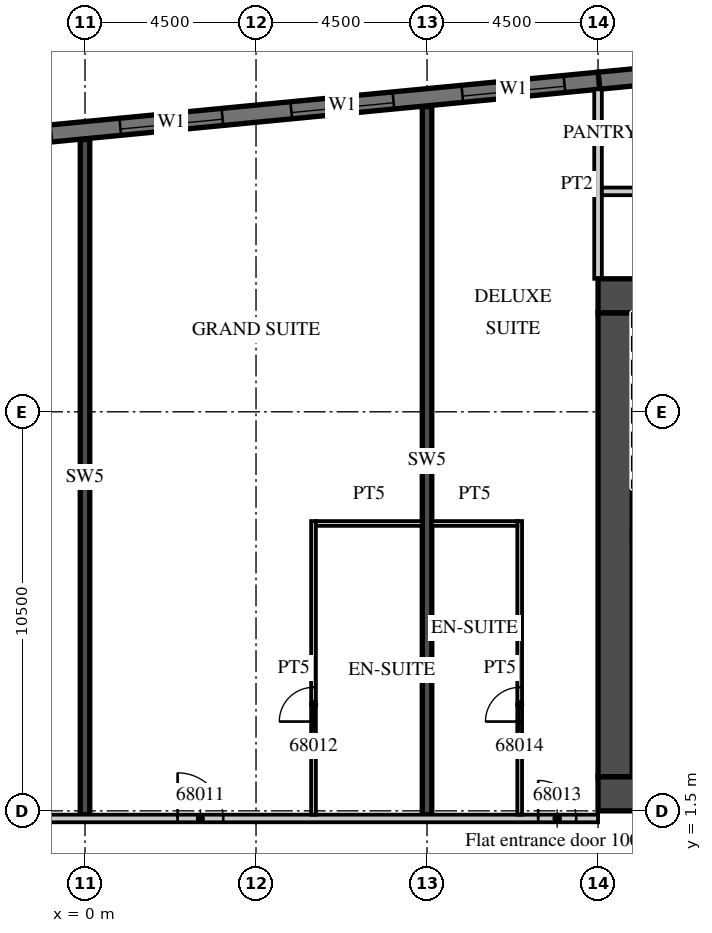
"""IFC4 building model, lengths in metres.
Left out: names, types, materials, properties, quantities, classifications, styles, units other than length and angle.
Written with IfcOpenShell. Run it as: python <this file> out.ifc"""

import sys

from ifc_helpers import new_model, si_unit, direction, frame, frame_2d, origin, place, context, subcontext, project, spatial, rectangle, extrude, element, fill, save


model = new_model("IFC4")
c1 = context("Model", 3, precision=1e-05, world=origin(), true_north=direction((0.0, 1.0)))
c2 = subcontext(c1, "Body", "Model", "MODEL_VIEW")
j1 = project(units=[si_unit("LENGTHUNIT", "METRE"), si_unit("PLANEANGLEUNIT", "RADIAN")], contexts=[c1])
p1 = place(None, origin())
s1 = spatial("IfcSite", under=j1, at=p1, CompositionType="ELEMENT")
p2 = place(p1, origin())
s2 = spatial("IfcBuilding", under=s1, at=p2, CompositionType="ELEMENT")
p3 = place(p2, frame((0.0, 0.0, 275.1)))
s3 = spatial("IfcBuildingStorey", under=s2, at=p3, CompositionType="ELEMENT", Elevation=275.1)
p4 = place(p3, frame((0.0, 1.4, 0.0), z_axis=(0.0, 0.0, 1.0), x_axis=(0.0, 1.0, 0.0)))
e1 = element("IfcWall", 1, at=p4, inside=s3, PredefinedType="SHEAR", context=c2, shape_type="SweptSolid", body=[
    extrude(rectangle(XDim=17.763, YDim=0.25, at=frame_2d((8.881, 0.0))), origin(), (0.0, 0.0, 1.0), 3.3),
])
p5 = place(p3, frame((9.0, 1.4, 0.0), z_axis=(0.0, 0.0, 1.0), x_axis=(0.0, 1.0, 0.0)))
e2 = element("IfcWall", 2, at=p5, inside=s3, PredefinedType="SHEAR", context=c2, shape_type="SweptSolid", body=[
    extrude(rectangle(XDim=18.629, YDim=0.25, at=frame_2d((9.315, 0.0))), origin(), (0.0, 0.0, 1.0), 3.3),
])
p6 = place(p3, frame((30.946, 22.391, 0.0), z_axis=(0.0, 0.0, 1.0), x_axis=(-0.995396397117, -0.095843688398, 0.0)))
e3 = element("IfcWall", 3, at=p6, inside=s3, PredefinedType="SOLIDWALL", context=c2, shape_type="SweptSolid", body=[
    extrude(rectangle(XDim=17.505, YDim=0.45, at=frame_2d((8.752, 0.0))), origin(), (0.0, 0.0, 1.0), 3.02),
])
p7 = place(p3, frame((13.521, 20.713, 0.0), z_axis=(0.0, 0.0, 1.0), x_axis=(-0.995396277313, -0.095844932638, 0.0)))
e4 = element("IfcWall", 4, at=p7, inside=s3, PredefinedType="SOLIDWALL", context=c2, shape_type="SweptSolid", body=[
    extrude(rectangle(XDim=51.495, YDim=0.45, at=frame_2d((25.748, 0.0))), origin(), (0.0, 0.0, 1.0), 3.02),
])
p8 = place(p7, frame((0.91, 0.0, 0.45)))
e5 = element("IfcOpeningElement", 5, at=p8, cuts=e4, PredefinedType="OPENING", context=c2, shape_type="SweptSolid", body=[
    extrude(rectangle(XDim=2.7, YDim=2.25, at=frame_2d((1.35, 1.125))), frame((0.0, 0.235, 0.0), z_axis=(0.0, -1.0, 0.0), x_axis=(1.0, 0.0, 0.0)), (0.0, 0.0, 1.0), 0.47),
])
p9 = place(p7, frame((5.431, 0.0, 0.45)))
e6 = element("IfcOpeningElement", 6, at=p9, cuts=e4, PredefinedType="OPENING", context=c2, shape_type="SweptSolid", body=[
    extrude(rectangle(XDim=2.7, YDim=2.25, at=frame_2d((1.35, 1.125))), frame((0.0, 0.235, 0.0), z_axis=(0.0, -1.0, 0.0), x_axis=(1.0, 0.0, 0.0)), (0.0, 0.0, 1.0), 0.47),
])
p10 = place(p7, frame((9.952, 0.0, 0.45)))
e7 = element("IfcOpeningElement", 7, at=p10, cuts=e4, PredefinedType="OPENING", context=c2, shape_type="SweptSolid", body=[
    extrude(rectangle(XDim=2.7, YDim=2.25, at=frame_2d((1.35, 1.125))), frame((0.0, 0.235, 0.0), z_axis=(0.0, -1.0, 0.0), x_axis=(1.0, 0.0, 0.0)), (0.0, 0.0, 1.0), 0.47),
])
p11 = place(p7, frame((14.473, 0.0, 0.45)))
e8 = element("IfcOpeningElement", 8, at=p11, cuts=e4, PredefinedType="OPENING", context=c2, shape_type="SweptSolid", body=[
    extrude(rectangle(XDim=2.7, YDim=2.25, at=frame_2d((1.35, 1.125))), frame((0.0, 0.235, 0.0), z_axis=(0.0, -1.0, 0.0), x_axis=(1.0, 0.0, 0.0)), (0.0, 0.0, 1.0), 0.47),
])
p12 = place(p7, frame((18.994, 0.0, 0.45)))
e9 = element("IfcOpeningElement", 9, at=p12, cuts=e4, PredefinedType="OPENING", context=c2, shape_type="SweptSolid", body=[
    extrude(rectangle(XDim=2.7, YDim=2.25, at=frame_2d((1.35, 1.125))), frame((0.0, 0.235, 0.0), z_axis=(0.0, -1.0, 0.0), x_axis=(1.0, 0.0, 0.0)), (0.0, 0.0, 1.0), 0.47),
])
p13 = place(p7, frame((23.514, 0.0, 0.45)))
e10 = element("IfcOpeningElement", 10, at=p13, cuts=e4, PredefinedType="OPENING", context=c2, shape_type="SweptSolid", body=[
    extrude(rectangle(XDim=2.7, YDim=2.25, at=frame_2d((1.35, 1.125))), frame((0.0, 0.235, 0.0), z_axis=(0.0, -1.0, 0.0), x_axis=(1.0, 0.0, 0.0)), (0.0, 0.0, 1.0), 0.47),
])
p14 = place(p7, frame((28.035, 0.0, 0.45)))
e11 = element("IfcOpeningElement", 11, at=p14, cuts=e4, PredefinedType="OPENING", context=c2, shape_type="SweptSolid", body=[
    extrude(rectangle(XDim=2.7, YDim=2.25, at=frame_2d((1.35, 1.125))), frame((0.0, 0.235, 0.0), z_axis=(0.0, -1.0, 0.0), x_axis=(1.0, 0.0, 0.0)), (0.0, 0.0, 1.0), 0.47),
])
p15 = place(p7, frame((32.556, 0.0, 0.45)))
e12 = element("IfcOpeningElement", 12, at=p15, cuts=e4, PredefinedType="OPENING", context=c2, shape_type="SweptSolid", body=[
    extrude(rectangle(XDim=2.7, YDim=2.25, at=frame_2d((1.35, 1.125))), frame((0.0, 0.235, 0.0), z_axis=(0.0, -1.0, 0.0), x_axis=(1.0, 0.0, 0.0)), (0.0, 0.0, 1.0), 0.47),
])
p16 = place(p7, frame((37.077, 0.0, 0.45)))
e13 = element("IfcOpeningElement", 13, at=p16, cuts=e4, PredefinedType="OPENING", context=c2, shape_type="SweptSolid", body=[
    extrude(rectangle(XDim=2.7, YDim=2.25, at=frame_2d((1.35, 1.125))), frame((0.0, 0.235, 0.0), z_axis=(0.0, -1.0, 0.0), x_axis=(1.0, 0.0, 0.0)), (0.0, 0.0, 1.0), 0.47),
])
p17 = place(p7, frame((41.598, 0.0, 0.45)))
e14 = element("IfcOpeningElement", 14, at=p17, cuts=e4, PredefinedType="OPENING", context=c2, shape_type="SweptSolid", body=[
    extrude(rectangle(XDim=2.7, YDim=2.25, at=frame_2d((1.35, 1.125))), frame((0.0, 0.235, 0.0), z_axis=(0.0, -1.0, 0.0), x_axis=(1.0, 0.0, 0.0)), (0.0, 0.0, 1.0), 0.47),
])
p18 = place(p7, frame((46.118, 0.0, 0.45)))
e15 = element("IfcOpeningElement", 15, at=p18, cuts=e4, PredefinedType="OPENING", context=c2, shape_type="SweptSolid", body=[
    extrude(rectangle(XDim=2.7, YDim=2.25, at=frame_2d((1.35, 1.125))), frame((0.0, 0.235, 0.0), z_axis=(0.0, -1.0, 0.0), x_axis=(1.0, 0.0, 0.0)), (0.0, 0.0, 1.0), 0.47),
])
p19 = place(p3, frame((13.5, 15.5, 0.0), z_axis=(0.0, 0.0, 1.0), x_axis=(0.0, 1.0, 0.0)))
e16 = element("IfcWall", 16, at=p19, inside=s3, PredefinedType="PARTITIONING", context=c2, shape_type="SweptSolid", body=[
    extrude(rectangle(XDim=4.985, YDim=0.2, at=frame_2d((2.493, 0.0))), origin(), (0.0, 0.0, 1.0), 3.02),
])
p20 = place(p3, frame((-39.909, 1.3, 0.0), z_axis=(0.0, 0.0, 1.0), x_axis=(1.0, 0.0, 0.0)))
e17 = element("IfcWall", 17, at=p20, inside=s3, PredefinedType="PARTITIONING", context=c2, shape_type="SweptSolid", body=[
    extrude(rectangle(XDim=53.409, YDim=0.2, at=frame_2d((26.705, 0.0))), origin(), (0.0, 0.0, 1.0), 3.02),
])
p21 = place(p20, frame((0.15, 0.0, 0.0)))
e18 = element("IfcOpeningElement", 18, at=p21, cuts=e17, PredefinedType="OPENING", context=c2, shape_type="SweptSolid", body=[
    extrude(rectangle(XDim=0.9, YDim=2.1, at=frame_2d((0.45, 1.05))), frame((0.0, 0.11, 0.0), z_axis=(0.0, -1.0, 0.0), x_axis=(1.0, 0.0, 0.0)), (0.0, 0.0, 1.0), 0.22),
])
p22 = place(p20, frame((9.271, 0.0, 0.0)))
e19 = element("IfcOpeningElement", 19, at=p22, cuts=e17, PredefinedType="OPENING", context=c2, shape_type="SweptSolid", body=[
    extrude(rectangle(XDim=1.2, YDim=2.1, at=frame_2d((0.6, 1.05))), frame((0.0, 0.11, 0.0), z_axis=(0.0, -1.0, 0.0), x_axis=(1.0, 0.0, 0.0)), (0.0, 0.0, 1.0), 0.22),
])
p23 = place(p20, frame((18.271, 0.0, 0.0)))
e20 = element("IfcOpeningElement", 20, at=p23, cuts=e17, PredefinedType="OPENING", context=c2, shape_type="SweptSolid", body=[
    extrude(rectangle(XDim=1.2, YDim=2.1, at=frame_2d((0.6, 1.05))), frame((0.0, 0.11, 0.0), z_axis=(0.0, -1.0, 0.0), x_axis=(1.0, 0.0, 0.0)), (0.0, 0.0, 1.0), 0.22),
])
p24 = place(p20, frame((27.271, 0.0, 0.0)))
e21 = element("IfcOpeningElement", 21, at=p24, cuts=e17, PredefinedType="OPENING", context=c2, shape_type="SweptSolid", body=[
    extrude(rectangle(XDim=1.2, YDim=2.1, at=frame_2d((0.6, 1.05))), frame((0.0, 0.11, 0.0), z_axis=(0.0, -1.0, 0.0), x_axis=(1.0, 0.0, 0.0)), (0.0, 0.0, 1.0), 0.22),
])
p25 = place(p20, frame((36.271, 0.0, 0.0)))
e22 = element("IfcOpeningElement", 22, at=p25, cuts=e17, PredefinedType="OPENING", context=c2, shape_type="SweptSolid", body=[
    extrude(rectangle(XDim=1.2, YDim=2.1, at=frame_2d((0.6, 1.05))), frame((0.0, 0.11, 0.0), z_axis=(0.0, -1.0, 0.0), x_axis=(1.0, 0.0, 0.0)), (0.0, 0.0, 1.0), 0.22),
])
p26 = place(p20, frame((42.346, 0.0, 0.0)))
e23 = element("IfcOpeningElement", 23, at=p26, cuts=e17, PredefinedType="OPENING", context=c2, shape_type="SweptSolid", body=[
    extrude(rectangle(XDim=1.2, YDim=2.1, at=frame_2d((0.6, 1.05))), frame((0.0, 0.11, 0.0), z_axis=(0.0, -1.0, 0.0), x_axis=(1.0, 0.0, 0.0)), (0.0, 0.0, 1.0), 0.22),
])
p27 = place(p20, frame((51.834, 0.0, 0.0)))
e24 = element("IfcOpeningElement", 24, at=p27, cuts=e17, PredefinedType="OPENING", context=c2, shape_type="SweptSolid", body=[
    extrude(rectangle(XDim=1.0, YDim=2.1, at=frame_2d((0.5, 1.05))), frame((0.0, 0.11, 0.0), z_axis=(0.0, -1.0, 0.0), x_axis=(1.0, 0.0, 0.0)), (0.0, 0.0, 1.0), 0.22),
])
p28 = place(p3, frame((6.013, 1.4, 0.0), z_axis=(0.0, 0.0, 1.0), x_axis=(0.0, 1.0, 0.0)))
e25 = element("IfcWall", 25, at=p28, inside=s3, PredefinedType="PARTITIONING", context=c2, shape_type="SweptSolid", body=[
    extrude(rectangle(XDim=7.725, YDim=0.125, at=frame_2d((3.863, 0.0))), origin(), (0.0, 0.0, 1.0), 3.02),
])
p29 = place(p28, frame((2.45, 0.0, 0.0)))
e26 = element("IfcOpeningElement", 26, at=p29, cuts=e25, PredefinedType="OPENING", context=c2, shape_type="SweptSolid", body=[
    extrude(rectangle(XDim=0.9, YDim=2.1, at=frame_2d((0.45, 1.05))), frame((0.0, 0.073, 0.0), z_axis=(0.0, -1.0, 0.0), x_axis=(1.0, 0.0, 0.0)), (0.0, 0.0, 1.0), 0.145),
])
p30 = place(p3, frame((6.075, 9.062, 0.0), z_axis=(0.0, 0.0, 1.0), x_axis=(1.0, 0.0, 0.0)))
e27 = element("IfcWall", 27, at=p30, inside=s3, PredefinedType="PARTITIONING", context=c2, shape_type="SweptSolid", body=[
    extrude(rectangle(XDim=2.8, YDim=0.125, at=frame_2d((1.4, 0.0))), origin(), (0.0, 0.0, 1.0), 3.02),
])
p31 = place(p3, frame((11.438, 1.4, 0.0), z_axis=(0.0, 0.0, 1.0), x_axis=(0.0, 1.0, 0.0)))
e28 = element("IfcWall", 28, at=p31, inside=s3, PredefinedType="PARTITIONING", context=c2, shape_type="SweptSolid", body=[
    extrude(rectangle(XDim=7.725, YDim=0.125, at=frame_2d((3.863, 0.0))), origin(), (0.0, 0.0, 1.0), 3.02),
])
p32 = place(p31, frame((2.45, 0.0, 0.0)))
e29 = element("IfcOpeningElement", 29, at=p32, cuts=e28, PredefinedType="OPENING", context=c2, shape_type="SweptSolid", body=[
    extrude(rectangle(XDim=0.9, YDim=2.1, at=frame_2d((0.45, 1.05))), frame((0.0, 0.073, 0.0), z_axis=(0.0, -1.0, 0.0), x_axis=(1.0, 0.0, 0.0)), (0.0, 0.0, 1.0), 0.145),
])
p33 = place(p3, frame((9.125, 9.062, 0.0), z_axis=(0.0, 0.0, 1.0), x_axis=(1.0, 0.0, 0.0)))
e30 = element("IfcWall", 30, at=p33, inside=s3, PredefinedType="PARTITIONING", context=c2, shape_type="SweptSolid", body=[
    extrude(rectangle(XDim=2.25, YDim=0.125, at=frame_2d((1.125, 0.0))), origin(), (0.0, 0.0, 1.0), 3.02),
])
p34 = place(p3, frame((13.5, 1.95, 0.0), z_axis=(0.0, 0.0, 1.0), x_axis=(1.0, 0.0, 0.0)))
e31 = element("IfcWall", 31, at=p34, inside=s3, PredefinedType="SHEAR", context=c2, shape_type="SweptSolid", body=[
    extrude(rectangle(XDim=18.0, YDim=0.9, at=frame_2d((9.0, 0.0))), origin(), (0.0, 0.0, 1.0), 3.02),
])
p35 = place(p34, frame((1.475, 0.0, 0.0)))
e32 = element("IfcOpeningElement", 32, at=p35, cuts=e31, PredefinedType="OPENING", context=c2, shape_type="SweptSolid", body=[
    extrude(rectangle(XDim=1.8, YDim=2.1, at=frame_2d((0.9, 1.05))), frame((0.0, 0.46, 0.0), z_axis=(0.0, -1.0, 0.0), x_axis=(1.0, 0.0, 0.0)), (0.0, 0.0, 1.0), 0.92),
])
p36 = place(p3, frame((13.5, 15.05, 0.0), z_axis=(0.0, 0.0, 1.0), x_axis=(1.0, 0.0, 0.0)))
e33 = element("IfcWall", 33, at=p36, inside=s3, PredefinedType="SHEAR", context=c2, shape_type="SweptSolid", body=[
    extrude(rectangle(XDim=6.8, YDim=0.9, at=frame_2d((3.4, 0.0))), origin(), (0.0, 0.0, 1.0), 3.02),
])
p37 = place(p36, frame((4.725, 0.0, 0.0)))
e34 = element("IfcOpeningElement", 34, at=p37, cuts=e33, PredefinedType="OPENING", context=c2, shape_type="SweptSolid", body=[
    extrude(rectangle(XDim=1.2, YDim=2.1, at=frame_2d((0.6, 1.05))), frame((0.0, 0.46, 0.0), z_axis=(0.0, -1.0, 0.0), x_axis=(1.0, 0.0, 0.0)), (0.0, 0.0, 1.0), 0.92),
])
p38 = place(p3, frame((13.95, 2.4, 0.0), z_axis=(0.0, 0.0, 1.0), x_axis=(0.0, 1.0, 0.0)))
e35 = element("IfcWall", 35, at=p38, inside=s3, PredefinedType="SHEAR", context=c2, shape_type="SweptSolid", body=[
    extrude(rectangle(XDim=12.2, YDim=0.9, at=frame_2d((6.1, 0.0))), origin(), (0.0, 0.0, 1.0), 3.02),
])
p39 = place(p3, frame((13.6, 17.8, 0.0), z_axis=(0.0, 0.0, 1.0), x_axis=(1.0, 0.0, 0.0)))
e36 = element("IfcWall", 36, at=p39, inside=s3, PredefinedType="PARTITIONING", context=c2, shape_type="SweptSolid", body=[
    extrude(rectangle(XDim=21.354, YDim=0.2, at=frame_2d((10.677, 0.0))), origin(), (0.0, 0.0, 1.0), 3.02),
])
p40 = place(p39, frame((15.012, 0.0, 0.0)))
e37 = element("IfcOpeningElement", 37, at=p40, cuts=e36, PredefinedType="OPENING", context=c2, shape_type="SweptSolid", body=[
    extrude(rectangle(XDim=0.9, YDim=2.1, at=frame_2d((0.45, 1.05))), frame((0.0, 0.11, 0.0), z_axis=(0.0, -1.0, 0.0), x_axis=(1.0, 0.0, 0.0)), (0.0, 0.0, 1.0), 0.22),
])
p41 = place(p39, frame((6.712, 0.0, 0.0)))
e38 = element("IfcOpeningElement", 38, at=p41, cuts=e36, PredefinedType="OPENING", context=c2, shape_type="SweptSolid", body=[
    extrude(rectangle(XDim=0.9, YDim=2.1, at=frame_2d((0.45, 1.05))), frame((0.0, 0.11, 0.0), z_axis=(0.0, -1.0, 0.0), x_axis=(1.0, 0.0, 0.0)), (0.0, 0.0, 1.0), 0.22),
])
p42 = place(p8, origin())
e39 = element("IfcWindow", 39, at=p42, inside=s3, PartitioningType="SINGLE_PANEL", PredefinedType="WINDOW", context=c2, shape_type="SweptSolid", body=[
    extrude(rectangle(XDim=2.7, YDim=2.25, at=frame_2d((1.35, 1.125))), frame((0.0, 0.09, 0.0), z_axis=(0.0, -1.0, 0.0), x_axis=(1.0, 0.0, 0.0)), (0.0, 0.0, 1.0), 0.06),
])
fill(e5, e39)
p43 = place(p9, origin())
e40 = element("IfcWindow", 40, at=p43, inside=s3, PartitioningType="SINGLE_PANEL", PredefinedType="WINDOW", context=c2, shape_type="SweptSolid", body=[
    extrude(rectangle(XDim=2.7, YDim=2.25, at=frame_2d((1.35, 1.125))), frame((0.0, 0.09, 0.0), z_axis=(0.0, -1.0, 0.0), x_axis=(1.0, 0.0, 0.0)), (0.0, 0.0, 1.0), 0.06),
])
fill(e6, e40)
p44 = place(p10, origin())
e41 = element("IfcWindow", 41, at=p44, inside=s3, PartitioningType="SINGLE_PANEL", PredefinedType="WINDOW", context=c2, shape_type="SweptSolid", body=[
    extrude(rectangle(XDim=2.7, YDim=2.25, at=frame_2d((1.35, 1.125))), frame((0.0, 0.09, 0.0), z_axis=(0.0, -1.0, 0.0), x_axis=(1.0, 0.0, 0.0)), (0.0, 0.0, 1.0), 0.06),
])
fill(e7, e41)
p45 = place(p26, origin())
e42 = element("IfcDoor", 42, at=p45, inside=s3, OperationType="SINGLE_SWING_LEFT", PredefinedType="DOOR", context=c2, shape_type="SweptSolid", body=[
    extrude(rectangle(XDim=1.2, YDim=2.1, at=frame_2d((0.6, 1.05))), frame((0.0, 0.025, 0.0), z_axis=(0.0, -1.0, 0.0), x_axis=(1.0, 0.0, 0.0)), (0.0, 0.0, 1.0), 0.05),
])
fill(e23, e42)
p46 = place(p29, origin())
e43 = element("IfcDoor", 43, at=p46, inside=s3, OperationType="SINGLE_SWING_LEFT", PredefinedType="DOOR", context=c2, shape_type="SweptSolid", body=[
    extrude(rectangle(XDim=0.9, YDim=2.1, at=frame_2d((0.45, 1.05))), frame((0.0, 0.025, 0.0), z_axis=(0.0, -1.0, 0.0), x_axis=(1.0, 0.0, 0.0)), (0.0, 0.0, 1.0), 0.05),
])
fill(e26, e43)
p47 = place(p27, origin())
e44 = element("IfcDoor", 44, at=p47, inside=s3, OperationType="SINGLE_SWING_LEFT", PredefinedType="DOOR", context=c2, shape_type="SweptSolid", body=[
    extrude(rectangle(XDim=1.0, YDim=2.1, at=frame_2d((0.5, 1.05))), frame((0.0, 0.025, 0.0), z_axis=(0.0, -1.0, 0.0), x_axis=(1.0, 0.0, 0.0)), (0.0, 0.0, 1.0), 0.05),
])
fill(e24, e44)
p48 = place(p32, origin())
e45 = element("IfcDoor", 45, at=p48, inside=s3, OperationType="SINGLE_SWING_LEFT", PredefinedType="DOOR", context=c2, shape_type="SweptSolid", body=[
    extrude(rectangle(XDim=0.9, YDim=2.1, at=frame_2d((0.45, 1.05))), frame((0.0, 0.025, 0.0), z_axis=(0.0, -1.0, 0.0), x_axis=(1.0, 0.0, 0.0)), (0.0, 0.0, 1.0), 0.05),
])
fill(e29, e45)
save(model, sys.argv[1])
